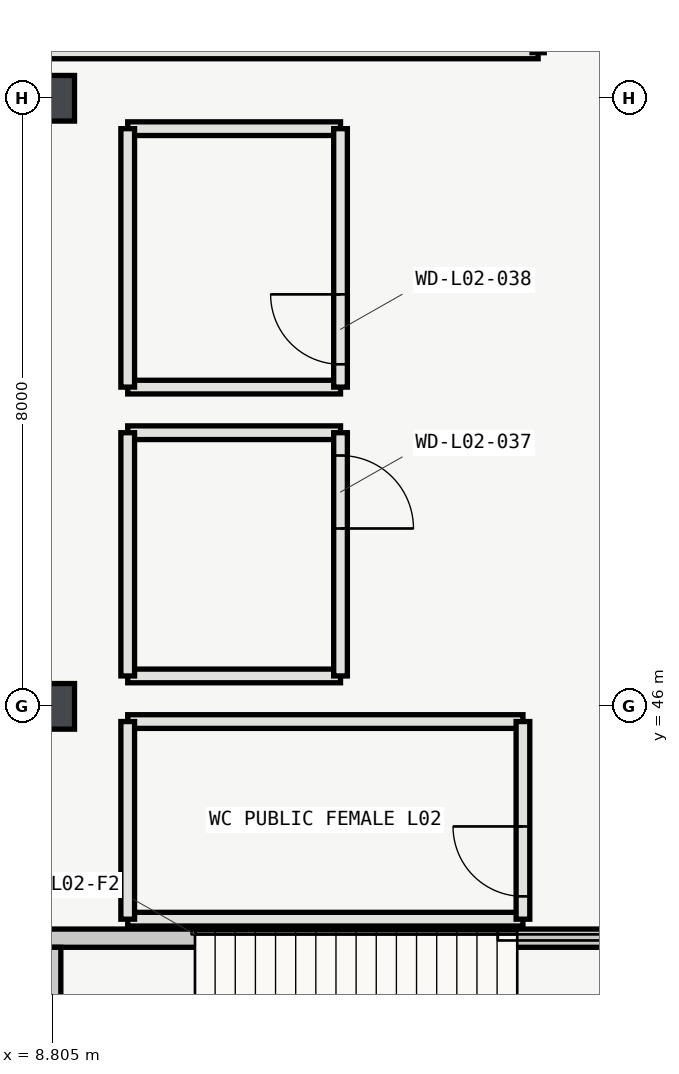
"""IFC4 building model, lengths in metres.
Left out: names, types, materials, properties, quantities, classifications, styles, units other than length and angle.
Written with IfcOpenShell. Run it as: python <this file> out.ifc"""

import sys

from ifc_helpers import new_model, si_unit, direction, frame, frame_2d, origin, origin_2d, place, context, subcontext, project, spatial, rectangle, hollow_rectangle, extrude, element, fill, save


model = new_model("IFC4")
c1 = context("Model", 3, precision=1e-05, world=origin(), true_north=direction((0.0, 1.0)))
c2 = subcontext(c1, "Body", "Model", "MODEL_VIEW")
j1 = project(units=[si_unit("LENGTHUNIT", "METRE"), si_unit("PLANEANGLEUNIT", "RADIAN")], contexts=[c1])
p1 = place(None, origin())
s1 = spatial("IfcSite", under=j1, at=p1, CompositionType="ELEMENT")
p2 = place(p1, origin())
s2 = spatial("IfcBuilding", under=s1, at=p2, CompositionType="ELEMENT")
p3 = place(p2, frame((0.0, 0.0, 10.8)))
s3 = spatial("IfcBuildingStorey", under=s2, at=p3, CompositionType="ELEMENT", Elevation=10.8)
for number, where, z_axis, x_axis in (
    (1, (8.8, 46.0, 0.0), (0.0, 0.0, 1.0), (1.0, 0.0, 0.0)),
    (2, (8.8, 54.0, 0.0), (0.0, 0.0, 1.0), (1.0, 0.0, 0.0)),
):
    element("IfcColumn", number, at=place(p3, frame(where, z_axis=z_axis, x_axis=x_axis)), inside=s3, PredefinedType="COLUMN", context=c2, shape_type="SweptSolid", body=[
        extrude(hollow_rectangle(XDim=0.6, YDim=0.6, WallThickness=0.024, InnerFilletRadius=0.024, OuterFilletRadius=0.048, at=origin_2d()), origin(), (0.0, 0.0, 1.0), 5.4),
    ])
for number, where, z_axis, x_axis in (
    (3, (9.8, 46.4, 0.0), (0.0, 0.0, 1.0), (1.0, 0.0, 0.0)),
    (4, (12.6, 49.6, 0.0), (0.0, 0.0, 1.0), (-1.0, 0.0, 0.0)),
):
    element("IfcWall", number, at=place(p3, frame(where, z_axis=z_axis, x_axis=x_axis)), inside=s3, PredefinedType="PLUMBINGWALL", context=c2, shape_type="SweptSolid", body=[
        extrude(rectangle(XDim=2.8, YDim=0.18, at=frame_2d((1.4, 0.0))), origin(), (0.0, 0.0, 1.0), 5.12),
    ])
p4 = place(p3, frame((9.8, 49.6, 0.0), z_axis=(0.0, 0.0, 1.0), x_axis=(0.0, -1.0, 0.0)))
e5 = element("IfcWall", 5, at=p4, inside=s3, PredefinedType="PLUMBINGWALL", context=c2, shape_type="SweptSolid", body=[
    extrude(rectangle(XDim=3.2, YDim=0.18, at=frame_2d((1.6, 0.0))), origin(), (0.0, 0.0, 1.0), 5.12),
])
p5 = place(p3, frame((12.6, 46.4, 0.0), z_axis=(0.0, 0.0, 1.0), x_axis=(0.0, 1.0, 0.0)))
e6 = element("IfcWall", 6, at=p5, inside=s3, PredefinedType="PLUMBINGWALL", context=c2, shape_type="SweptSolid", body=[
    extrude(rectangle(XDim=3.2, YDim=0.18, at=frame_2d((1.6, 0.0))), origin(), (0.0, 0.0, 1.0), 5.12),
])
p6 = place(p5, frame((1.94, 0.0, 0.0)))
e7 = element("IfcOpeningElement", 7, at=p6, cuts=e6, PredefinedType="OPENING", context=c2, shape_type="SweptSolid", body=[
    extrude(rectangle(XDim=0.96, YDim=2.1, at=frame_2d((0.48, 1.05))), frame((0.0, 0.1, 0.0), z_axis=(0.0, -1.0, 0.0), x_axis=(1.0, 0.0, 0.0)), (0.0, 0.0, 1.0), 0.2),
])
for number, where, z_axis, x_axis in (
    (8, (9.8, 50.2, 0.0), (0.0, 0.0, 1.0), (1.0, 0.0, 0.0)),
    (9, (12.6, 53.6, 0.0), (0.0, 0.0, 1.0), (-1.0, 0.0, 0.0)),
):
    element("IfcWall", number, at=place(p3, frame(where, z_axis=z_axis, x_axis=x_axis)), inside=s3, PredefinedType="PLUMBINGWALL", context=c2, shape_type="SweptSolid", body=[
        extrude(rectangle(XDim=2.8, YDim=0.18, at=frame_2d((1.4, 0.0))), origin(), (0.0, 0.0, 1.0), 5.12),
    ])
p7 = place(p3, frame((9.8, 53.6, 0.0), z_axis=(0.0, 0.0, 1.0), x_axis=(0.0, -1.0, 0.0)))
e10 = element("IfcWall", 10, at=p7, inside=s3, PredefinedType="PLUMBINGWALL", context=c2, shape_type="SweptSolid", body=[
    extrude(rectangle(XDim=3.4, YDim=0.18, at=frame_2d((1.7, 0.0))), origin(), (0.0, 0.0, 1.0), 5.12),
])
p8 = place(p3, frame((12.6, 50.2, 0.0), z_axis=(0.0, 0.0, 1.0), x_axis=(0.0, 1.0, 0.0)))
e11 = element("IfcWall", 11, at=p8, inside=s3, PredefinedType="PLUMBINGWALL", context=c2, shape_type="SweptSolid", body=[
    extrude(rectangle(XDim=3.4, YDim=0.18, at=frame_2d((1.7, 0.0))), origin(), (0.0, 0.0, 1.0), 5.12),
])
p9 = place(p8, frame((0.3, 0.0, 0.0)))
e12 = element("IfcOpeningElement", 12, at=p9, cuts=e11, PredefinedType="OPENING", context=c2, shape_type="SweptSolid", body=[
    extrude(rectangle(XDim=0.92, YDim=2.1, at=frame_2d((0.46, 1.05))), frame((0.0, 0.1, 0.0), z_axis=(0.0, -1.0, 0.0), x_axis=(1.0, 0.0, 0.0)), (0.0, 0.0, 1.0), 0.2),
])
p10 = place(p3, frame((9.8, 43.2, 0.0), z_axis=(0.0, 0.0, 1.0), x_axis=(1.0, 0.0, 0.0)))
e13 = element("IfcWall", 13, at=p10, inside=s3, PredefinedType="PLUMBINGWALL", context=c2, shape_type="SweptSolid", body=[
    extrude(rectangle(XDim=5.2, YDim=0.18, at=frame_2d((2.6, 0.0))), origin(), (0.0, 0.0, 1.0), 5.12),
])
p11 = place(p3, frame((15.0, 45.8, 0.0), z_axis=(0.0, 0.0, 1.0), x_axis=(-1.0, 0.0, 0.0)))
e14 = element("IfcWall", 14, at=p11, inside=s3, PredefinedType="PLUMBINGWALL", context=c2, shape_type="SweptSolid", body=[
    extrude(rectangle(XDim=5.2, YDim=0.18, at=frame_2d((2.6, 0.0))), origin(), (0.0, 0.0, 1.0), 4.786),
])
p12 = place(p3, frame((9.8, 45.8, 0.0), z_axis=(0.0, 0.0, 1.0), x_axis=(0.0, -1.0, 0.0)))
e15 = element("IfcWall", 15, at=p12, inside=s3, PredefinedType="PLUMBINGWALL", context=c2, shape_type="SweptSolid", body=[
    extrude(rectangle(XDim=2.6, YDim=0.18, at=frame_2d((1.3, 0.0))), origin(), (0.0, 0.0, 1.0), 5.12),
])
p13 = place(p3, frame((15.0, 43.2, 0.0), z_axis=(0.0, 0.0, 1.0), x_axis=(0.0, 1.0, 0.0)))
e16 = element("IfcWall", 16, at=p13, inside=s3, PredefinedType="PLUMBINGWALL", context=c2, shape_type="SweptSolid", body=[
    extrude(rectangle(XDim=2.6, YDim=0.18, at=frame_2d((1.3, 0.0))), origin(), (0.0, 0.0, 1.0), 5.12),
])
p14 = place(p13, frame((0.3, 0.0, 0.0)))
e17 = element("IfcOpeningElement", 17, at=p14, cuts=e16, PredefinedType="OPENING", context=c2, shape_type="SweptSolid", body=[
    extrude(rectangle(XDim=0.92, YDim=2.1, at=frame_2d((0.46, 1.05))), frame((0.0, 0.1, 0.0), z_axis=(0.0, -1.0, 0.0), x_axis=(1.0, 0.0, 0.0)), (0.0, 0.0, 1.0), 0.2),
])
p15 = place(p3, frame((0.8, 54.6, 0.0), z_axis=(0.0, 0.0, 1.0), x_axis=(1.0, 0.0, 0.0)))
e18 = element("IfcWall", 18, at=p15, inside=s3, PredefinedType="PARTITIONING", context=c2, shape_type="SweptSolid", body=[
    extrude(rectangle(XDim=14.4, YDim=0.16, at=frame_2d((7.2, 0.0))), origin(), (0.0, 0.0, 1.0), 5.12),
])
p16 = place(p3, frame((17.72, 42.95, 0.0), z_axis=(0.0, 0.0, 1.0), x_axis=(-1.0, 0.0, 0.0)))
e19 = element("IfcWall", 19, at=p16, inside=s3, PredefinedType="SHEAR", context=c2, shape_type="SweptSolid", body=[
    extrude(rectangle(XDim=9.04, YDim=0.24, at=frame_2d((4.52, 0.0))), origin(), (0.0, 0.0, 1.0), 5.12),
])
p17 = place(p3, frame((8.8, 38.67, 0.0), z_axis=(0.0, 0.0, 1.0), x_axis=(0.0, 1.0, 0.0)))
e20 = element("IfcWall", 20, at=p17, inside=s3, PredefinedType="SHEAR", context=c2, shape_type="SweptSolid", body=[
    extrude(rectangle(XDim=4.16, YDim=0.24, at=frame_2d((2.08, 0.0))), origin(), (0.0, 0.0, 1.0), 5.12),
])
p18 = place(p17, frame((1.38, 0.0, 0.0)))
e21 = element("IfcOpeningElement", 21, at=p18, cuts=e20, PredefinedType="OPENING", context=c2, shape_type="SweptSolid", body=[
    extrude(rectangle(XDim=1.4, YDim=2.2, at=frame_2d((0.7, 1.1))), frame((0.0, 0.13, 0.0), z_axis=(0.0, -1.0, 0.0), x_axis=(1.0, 0.0, 0.0)), (0.0, 0.0, 1.0), 0.26),
])
p19 = place(p6, origin())
e22 = element("IfcDoor", 22, at=p19, inside=s3, OperationType="SINGLE_SWING_LEFT", PredefinedType="DOOR", context=c2, shape_type="SweptSolid", body=[
    extrude(rectangle(XDim=0.96, YDim=2.1, at=frame_2d((0.48, 1.05))), frame((0.0, 0.025, 0.0), z_axis=(0.0, -1.0, 0.0), x_axis=(1.0, 0.0, 0.0)), (0.0, 0.0, 1.0), 0.05),
])
fill(e7, e22)
p20 = place(p9, origin())
e23 = element("IfcDoor", 23, at=p20, inside=s3, OperationType="SINGLE_SWING_RIGHT", PredefinedType="DOOR", context=c2, shape_type="SweptSolid", body=[
    extrude(rectangle(XDim=0.92, YDim=2.1, at=frame_2d((0.46, 1.05))), frame((0.0, 0.025, 0.0), z_axis=(0.0, -1.0, 0.0), x_axis=(1.0, 0.0, 0.0)), (0.0, 0.0, 1.0), 0.05),
])
fill(e12, e23)
p21 = place(p14, origin())
e24 = element("IfcDoor", 24, at=p21, inside=s3, OperationType="SINGLE_SWING_RIGHT", PredefinedType="DOOR", context=c2, shape_type="SweptSolid", body=[
    extrude(rectangle(XDim=0.92, YDim=2.1, at=frame_2d((0.46, 1.05))), frame((0.0, 0.025, 0.0), z_axis=(0.0, -1.0, 0.0), x_axis=(1.0, 0.0, 0.0)), (0.0, 0.0, 1.0), 0.05),
])
fill(e17, e24)
save(model, sys.argv[1])
